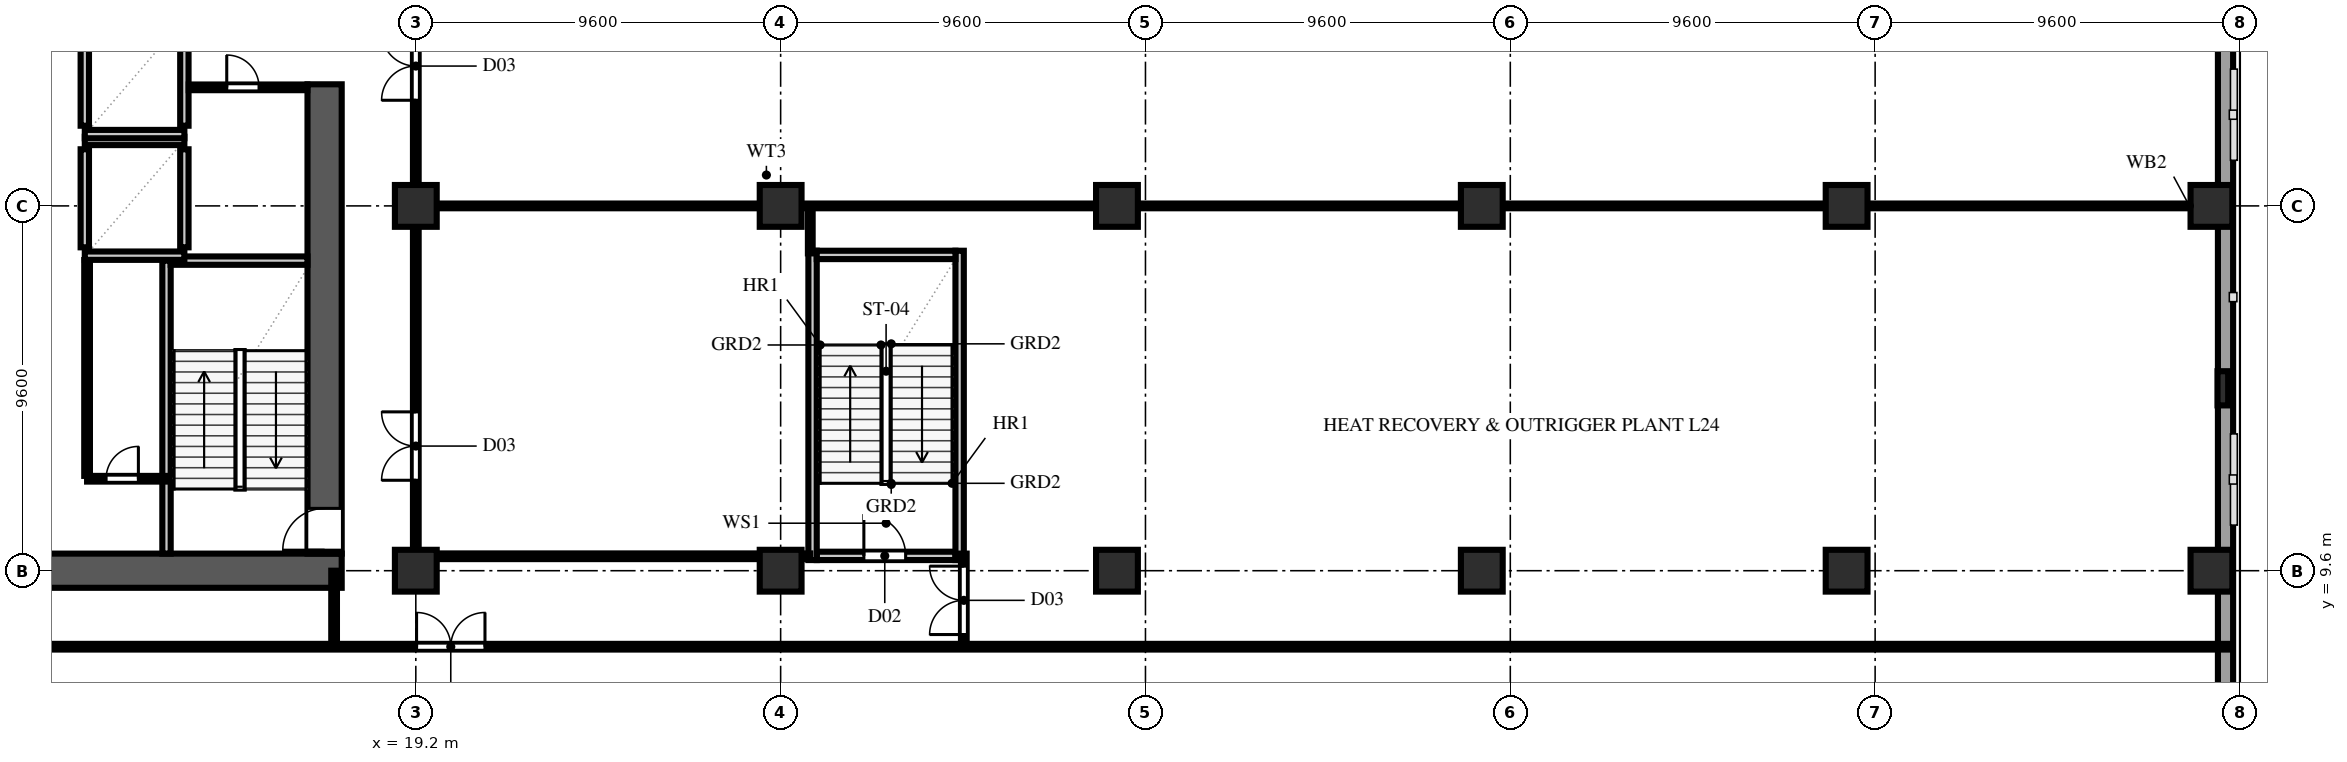
"""IFC4 building model, lengths in metres.
Left out: names, types, materials, properties, quantities, classifications, styles, units other than length and angle.
Written with IfcOpenShell. Run it as: python <this file> out.ifc"""

import sys

from ifc_helpers import new_model, si_unit, direction, frame, frame_2d, origin, origin_2d, place, context, subcontext, project, spatial, rectangle, extrude, element, fill, save


model = new_model("IFC4")
c1 = context("Model", 3, precision=1e-05, world=origin(), true_north=direction((0.0, 1.0)))
c2 = subcontext(c1, "Body", "Model", "MODEL_VIEW")
j1 = project(units=[si_unit("LENGTHUNIT", "METRE"), si_unit("PLANEANGLEUNIT", "RADIAN")], contexts=[c1])
p1 = place(None, origin())
s1 = spatial("IfcSite", under=j1, at=p1, CompositionType="ELEMENT")
p2 = place(p1, origin())
s2 = spatial("IfcBuilding", under=s1, at=p2, CompositionType="ELEMENT")
p3 = place(p2, frame((0.0, 0.0, 96.4)))
s3 = spatial("IfcBuildingStorey", under=s2, at=p3, CompositionType="ELEMENT", Elevation=96.4)
p4 = place(p3, frame((2.65, 9.6, 0.0), z_axis=(0.0, 0.0, 1.0), x_axis=(1.0, 0.0, 0.0)))
e1 = element("IfcWall", 1, at=p4, inside=s3, PredefinedType="SHEAR", context=c2, shape_type="SweptSolid", body=[
    extrude(rectangle(XDim=14.6, YDim=0.9, at=frame_2d((7.3, 0.0))), origin(), (0.0, 0.0, 1.0), 4.74),
])
p5 = place(p3, frame((16.8, 10.05, 0.0), z_axis=(0.0, 0.0, 1.0), x_axis=(0.0, 1.0, 0.0)))
e2 = element("IfcWall", 2, at=p5, inside=s3, PredefinedType="SHEAR", context=c2, shape_type="SweptSolid", body=[
    extrude(rectangle(XDim=12.35, YDim=0.9, at=frame_2d((6.175, 0.0))), origin(), (0.0, 0.0, 1.0), 4.74),
])
p6 = place(p5, frame((0.09, 0.0, 0.0)))
e3 = element("IfcOpeningElement", 3, at=p6, cuts=e2, PredefinedType="OPENING", context=c2, shape_type="SweptSolid", body=[
    extrude(rectangle(XDim=1.1, YDim=2.2, at=frame_2d((0.55, 1.1))), frame((0.0, 0.462, 0.0), z_axis=(0.0, -1.0, 0.0), x_axis=(1.0, 0.0, 0.0)), (0.0, 0.0, 1.0), 0.924),
])
for number, where, z_axis, x_axis in (
    (4, (19.2, 9.6, 0.0), (0.0, 0.0, 1.0), (1.0, 0.0, 0.0)),
    (5, (19.2, 19.2, 0.0), (0.0, 0.0, 1.0), (1.0, 0.0, 0.0)),
    (6, (28.8, 9.6, 0.0), (0.0, 0.0, 1.0), (1.0, 0.0, 0.0)),
    (7, (28.8, 19.2, 0.0), (0.0, 0.0, 1.0), (1.0, 0.0, 0.0)),
    (8, (37.65, 9.6, 0.0), (0.0, 0.0, 1.0), (1.0, 0.0, 0.0)),
    (9, (37.65, 19.2, 0.0), (0.0, 0.0, 1.0), (1.0, 0.0, 0.0)),
    (10, (47.25, 9.6, 0.0), (0.0, 0.0, 1.0), (1.0, 0.0, 0.0)),
    (11, (47.25, 19.2, 0.0), (0.0, 0.0, 1.0), (1.0, 0.0, 0.0)),
    (12, (56.85, 9.6, 0.0), (0.0, 0.0, 1.0), (1.0, 0.0, 0.0)),
    (13, (56.85, 19.2, 0.0), (0.0, 0.0, 1.0), (1.0, 0.0, 0.0)),
):
    element("IfcColumn", number, at=place(p3, frame(where, z_axis=z_axis, x_axis=x_axis)), inside=s3, PredefinedType="COLUMN", context=c2, shape_type="SweptSolid", body=[
        extrude(rectangle(XDim=1.1, YDim=1.1, at=origin_2d()), origin(), (0.0, 0.0, 1.0), 5.0),
    ])
for number, where, z_axis, x_axis in (
    (14, (66.45, 9.6, 0.0), (0.0, 0.0, 1.0), (1.0, 0.0, 0.0)),
    (15, (66.45, 19.2, 0.0), (0.0, 0.0, 1.0), (1.0, 0.0, 0.0)),
):
    element("IfcColumn", number, at=place(p3, frame(where, z_axis=z_axis, x_axis=x_axis)), inside=s3, PredefinedType="COLUMN", context=c2, shape_type="SweptSolid", body=[
        extrude(rectangle(XDim=1.1, YDim=1.1, at=origin_2d()), origin(), (0.0, 0.0, 1.0), 4.7),
    ])
p7 = place(p3, frame((66.75, 14.4, 0.0), z_axis=(0.0, 0.0, 1.0), x_axis=(0.0, 1.0, 0.0)))
e16 = element("IfcColumn", 16, at=p7, inside=s3, PredefinedType="PILASTER", context=c2, shape_type="SweptSolid", body=[
    extrude(rectangle(XDim=0.9, YDim=0.28, at=origin_2d()), origin(), (0.0, 0.0, 1.0), 4.7),
])
p8 = place(p3, frame((66.82, 1.84, 0.0), z_axis=(0.0, 0.0, 1.0), x_axis=(0.0, 1.0, 0.0)))
e17 = element("IfcWall", 17, at=p8, inside=s3, PredefinedType="SOLIDWALL", context=c2, shape_type="SweptSolid", body=[
    extrude(rectangle(XDim=34.72, YDim=0.4, at=frame_2d((17.36, 0.0))), origin(), (0.0, 0.0, 1.0), 4.7),
])
p9 = place(p3, frame((12.64, 10.05, 0.0), z_axis=(0.0, 0.0, 1.0), x_axis=(0.0, 1.0, 0.0)))
e18 = element("IfcWall", 18, at=p9, inside=s3, PredefinedType="SOLIDWALL", context=c2, shape_type="SweptSolid", body=[
    extrude(rectangle(XDim=7.71, YDim=0.22, at=frame_2d((3.855, 0.0))), origin(), (0.0, 0.0, 1.0), 4.74),
])
p10 = place(p3, frame((12.75, 17.76, 0.0), z_axis=(0.0, 0.0, 1.0), x_axis=(1.0, 0.0, 0.0)))
e19 = element("IfcWall", 19, at=p10, inside=s3, PredefinedType="SOLIDWALL", context=c2, shape_type="SweptSolid", body=[
    extrude(rectangle(XDim=3.6, YDim=0.22, at=frame_2d((1.8, 0.0))), origin(), (0.0, 0.0, 1.0), 4.74),
])
p11 = place(p3, frame((29.75, 9.99, 0.0), z_axis=(0.0, 0.0, 1.0), x_axis=(1.0, 0.0, 0.0)))
e20 = element("IfcWall", 20, at=p11, inside=s3, PredefinedType="SOLIDWALL", context=c2, shape_type="SweptSolid", body=[
    extrude(rectangle(XDim=3.65, YDim=0.22, at=frame_2d((1.825, 0.0))), origin(), (0.0, 0.0, 1.0), 4.74),
])
p12 = place(p11, frame((1.24, 0.0, 0.0)))
e21 = element("IfcOpeningElement", 21, at=p12, cuts=e20, PredefinedType="OPENING", context=c2, shape_type="SweptSolid", body=[
    extrude(rectangle(XDim=1.1, YDim=2.2, at=frame_2d((0.55, 1.1))), frame((0.0, 0.122, 0.0), z_axis=(0.0, -1.0, 0.0), x_axis=(1.0, 0.0, 0.0)), (0.0, 0.0, 1.0), 0.244),
])
for number, where, z_axis, x_axis in (
    (22, (29.64, 9.88, 0.0), (0.0, 0.0, 1.0), (0.0, 1.0, 0.0)),
    (23, (33.51, 9.88, 0.0), (0.0, 0.0, 1.0), (0.0, 1.0, 0.0)),
):
    element("IfcWall", number, at=place(p3, frame(where, z_axis=z_axis, x_axis=x_axis)), inside=s3, PredefinedType="SOLIDWALL", context=c2, shape_type="SweptSolid", body=[
        extrude(rectangle(XDim=8.14, YDim=0.22, at=frame_2d((4.07, 0.0))), origin(), (0.0, 0.0, 1.0), 4.74),
    ])
p13 = place(p3, frame((29.75, 17.91, 0.0), z_axis=(0.0, 0.0, 1.0), x_axis=(1.0, 0.0, 0.0)))
e24 = element("IfcWall", 24, at=p13, inside=s3, PredefinedType="SOLIDWALL", context=c2, shape_type="SweptSolid", body=[
    extrude(rectangle(XDim=3.65, YDim=0.22, at=frame_2d((1.825, 0.0))), origin(), (0.0, 0.0, 1.0), 4.74),
])
for number, where, z_axis, x_axis in (
    (25, (10.49, 18.11, 0.0), (0.0, 0.0, 1.0), (0.0, 1.0, 0.0)),
    (26, (13.11, 18.11, 0.0), (0.0, 0.0, 1.0), (0.0, 1.0, 0.0)),
):
    element("IfcWall", number, at=place(p3, frame(where, z_axis=z_axis, x_axis=x_axis)), inside=s3, PredefinedType="SOLIDWALL", context=c2, shape_type="SweptSolid", body=[
        extrude(rectangle(XDim=2.58, YDim=0.22, at=frame_2d((1.29, 0.0))), origin(), (0.0, 0.0, 1.0), 4.74),
    ])
for number, where, z_axis, x_axis in (
    (27, (10.49, 17.89, 0.0), (0.0, 0.0, 1.0), (1.0, 0.0, 0.0)),
    (28, (10.49, 20.91, 0.0), (0.0, 0.0, 1.0), (1.0, 0.0, 0.0)),
):
    element("IfcWall", number, at=place(p3, frame(where, z_axis=z_axis, x_axis=x_axis)), inside=s3, PredefinedType="SOLIDWALL", context=c2, shape_type="SweptSolid", body=[
        extrude(rectangle(XDim=2.62, YDim=0.22, at=frame_2d((1.31, 0.0))), origin(), (0.0, 0.0, 1.0), 4.74),
    ])
for number, where, z_axis, x_axis in (
    (29, (10.49, 21.31, 0.0), (0.0, 0.0, 1.0), (0.0, 1.0, 0.0)),
    (30, (13.11, 21.31, 0.0), (0.0, 0.0, 1.0), (0.0, 1.0, 0.0)),
):
    element("IfcWall", number, at=place(p3, frame(where, z_axis=z_axis, x_axis=x_axis)), inside=s3, PredefinedType="SOLIDWALL", context=c2, shape_type="SweptSolid", body=[
        extrude(rectangle(XDim=2.58, YDim=0.22, at=frame_2d((1.29, 0.0))), origin(), (0.0, 0.0, 1.0), 4.74),
    ])
p14 = place(p3, frame((10.49, 21.09, 0.0), z_axis=(0.0, 0.0, 1.0), x_axis=(1.0, 0.0, 0.0)))
e31 = element("IfcWall", 31, at=p14, inside=s3, PredefinedType="SOLIDWALL", context=c2, shape_type="SweptSolid", body=[
    extrude(rectangle(XDim=2.62, YDim=0.22, at=frame_2d((1.31, 0.0))), origin(), (0.0, 0.0, 1.0), 4.74),
])
p15 = place(p3, frame((10.55, 12.02, 0.0), z_axis=(0.0, 0.0, 1.0), x_axis=(1.0, 0.0, 0.0)))
e32 = element("IfcWall", 32, at=p15, inside=s3, PredefinedType="PARTITIONING", context=c2, shape_type="SweptSolid", body=[
    extrude(rectangle(XDim=2.08, YDim=0.15, at=frame_2d((1.04, 0.0))), origin(), (0.0, 0.0, 1.0), 4.74),
])
p16 = place(p15, frame((0.5, 0.0, 0.0)))
e33 = element("IfcOpeningElement", 33, at=p16, cuts=e32, PredefinedType="OPENING", context=c2, shape_type="SweptSolid", body=[
    extrude(rectangle(XDim=0.85, YDim=2.1, at=frame_2d((0.425, 1.05))), frame((0.0, 0.087, 0.0), z_axis=(0.0, -1.0, 0.0), x_axis=(1.0, 0.0, 0.0)), (0.0, 0.0, 1.0), 0.174),
])
p17 = place(p3, frame((10.55, 12.095, 0.0), z_axis=(0.0, 0.0, 1.0), x_axis=(0.0, 1.0, 0.0)))
e34 = element("IfcWall", 34, at=p17, inside=s3, PredefinedType="PARTITIONING", context=c2, shape_type="SweptSolid", body=[
    extrude(rectangle(XDim=5.68, YDim=0.15, at=frame_2d((2.84, 0.0))), origin(), (0.0, 0.0, 1.0), 4.74),
])
p18 = place(p3, frame((13.225, 22.32, 0.0), z_axis=(0.0, 0.0, 1.0), x_axis=(1.0, 0.0, 0.0)))
e35 = element("IfcWall", 35, at=p18, inside=s3, PredefinedType="PARTITIONING", context=c2, shape_type="SweptSolid", body=[
    extrude(rectangle(XDim=3.12, YDim=0.15, at=frame_2d((1.56, 0.0))), origin(), (0.0, 0.0, 1.0), 4.74),
])
p19 = place(p18, frame((1.0, 0.0, 0.0)))
e36 = element("IfcOpeningElement", 36, at=p19, cuts=e35, PredefinedType="OPENING", context=c2, shape_type="SweptSolid", body=[
    extrude(rectangle(XDim=0.85, YDim=2.1, at=frame_2d((0.425, 1.05))), frame((0.0, 0.087, 0.0), z_axis=(0.0, -1.0, 0.0), x_axis=(1.0, 0.0, 0.0)), (0.0, 0.0, 1.0), 0.174),
])
p20 = place(p3, frame((17.05, 7.6, 0.0), z_axis=(0.0, 0.0, 1.0), x_axis=(0.0, 1.0, 0.0)))
e37 = element("IfcWall", 37, at=p20, inside=s3, PredefinedType="PARTITIONING", context=c2, shape_type="SweptSolid", body=[
    extrude(rectangle(XDim=2.0, YDim=0.15, at=frame_2d((1.0, 0.0))), origin(), (0.0, 0.0, 1.0), 4.74),
])
p21 = place(p3, frame((0.22, 7.6, 0.0), z_axis=(0.0, 0.0, 1.0), x_axis=(1.0, 0.0, 0.0)))
e38 = element("IfcWall", 38, at=p21, inside=s3, PredefinedType="PARTITIONING", context=c2, shape_type="SweptSolid", body=[
    extrude(rectangle(XDim=66.76, YDim=0.15, at=frame_2d((33.38, 0.0))), origin(), (0.0, 0.0, 1.0), 4.74),
])
p22 = place(p21, frame((19.0, 0.0, 0.0)))
e39 = element("IfcOpeningElement", 39, at=p22, cuts=e38, PredefinedType="OPENING", context=c2, shape_type="SweptSolid", body=[
    extrude(rectangle(XDim=1.8, YDim=2.2, at=frame_2d((0.9, 1.1))), frame((0.0, 0.087, 0.0), z_axis=(0.0, -1.0, 0.0), x_axis=(1.0, 0.0, 0.0)), (0.0, 0.0, 1.0), 0.174),
])
p23 = place(p3, frame((33.62, 7.6, 0.0), z_axis=(0.0, 0.0, 1.0), x_axis=(0.0, 1.0, 0.0)))
e40 = element("IfcWall", 40, at=p23, inside=s3, PredefinedType="PARTITIONING", context=c2, shape_type="SweptSolid", body=[
    extrude(rectangle(XDim=2.45, YDim=0.15, at=frame_2d((1.225, 0.0))), origin(), (0.0, 0.0, 1.0), 4.74),
])
p24 = place(p23, frame((0.32, 0.0, 0.0)))
e41 = element("IfcOpeningElement", 41, at=p24, cuts=e40, PredefinedType="OPENING", context=c2, shape_type="SweptSolid", body=[
    extrude(rectangle(XDim=1.8, YDim=2.2, at=frame_2d((0.9, 1.1))), frame((0.0, 0.087, 0.0), z_axis=(0.0, -1.0, 0.0), x_axis=(1.0, 0.0, 0.0)), (0.0, 0.0, 1.0), 0.174),
])
p25 = place(p3, frame((19.2, 9.98, 0.0), z_axis=(0.0, 0.0, 1.0), x_axis=(1.0, 0.0, 0.0)))
e42 = element("IfcWall", 42, at=p25, inside=s3, PredefinedType="PARTITIONING", context=c2, shape_type="SweptSolid", body=[
    extrude(rectangle(XDim=10.38, YDim=0.15, at=frame_2d((5.19, 0.0))), origin(), (0.0, 0.0, 1.0), 4.74),
])
p26 = place(p3, frame((29.58, 17.95, 0.0), z_axis=(0.0, 0.0, 1.0), x_axis=(0.0, 1.0, 0.0)))
e43 = element("IfcWall", 43, at=p26, inside=s3, PredefinedType="PARTITIONING", context=c2, shape_type="SweptSolid", body=[
    extrude(rectangle(XDim=1.25, YDim=0.125, at=frame_2d((0.625, 0.0))), origin(), (0.0, 0.0, 1.0), 4.74),
])
p27 = place(p3, frame((19.2, 19.2, 0.0), z_axis=(0.0, 0.0, 1.0), x_axis=(1.0, 0.0, 0.0)))
e44 = element("IfcWall", 44, at=p27, inside=s3, PredefinedType="PARTITIONING", context=c2, shape_type="SweptSolid", body=[
    extrude(rectangle(XDim=18.45, YDim=0.125, at=frame_2d((9.225, 0.0))), origin(), (0.0, 0.0, 1.0), 2.323),
])
p28 = place(p3, frame((37.65, 19.2, 0.0), z_axis=(0.0, 0.0, 1.0), x_axis=(1.0, 0.0, 0.0)))
e45 = element("IfcWall", 45, at=p28, inside=s3, PredefinedType="PARTITIONING", context=c2, shape_type="SweptSolid", body=[
    extrude(rectangle(XDim=19.2, YDim=0.125, at=frame_2d((9.6, 0.0))), origin(), (0.0, 0.0, 1.0), 3.967),
])
p29 = place(p3, frame((56.85, 19.2, 0.0), z_axis=(0.0, 0.0, 1.0), x_axis=(1.0, 0.0, 0.0)))
e46 = element("IfcWall", 46, at=p29, inside=s3, PredefinedType="PARTITIONING", context=c2, shape_type="SweptSolid", body=[
    extrude(rectangle(XDim=9.6, YDim=0.125, at=frame_2d((4.8, 0.0))), origin(), (0.0, 0.0, 1.0), 3.927),
])
p30 = place(p3, frame((66.45, 19.2, 0.0), z_axis=(0.0, 0.0, 1.0), x_axis=(1.0, 0.0, 0.0)))
e47 = element("IfcWall", 47, at=p30, inside=s3, PredefinedType="PARTITIONING", context=c2, shape_type="SweptSolid", body=[
    extrude(rectangle(XDim=0.53, YDim=0.125, at=frame_2d((0.265, 0.0))), origin(), (0.0, 0.0, 1.0), 4.74),
])
p31 = place(p3, frame((19.2, 9.98, 0.0), z_axis=(0.0, 0.0, 1.0), x_axis=(0.0, 1.0, 0.0)))
e48 = element("IfcWall", 48, at=p31, inside=s3, PredefinedType="PARTITIONING", context=c2, shape_type="SweptSolid", body=[
    extrude(rectangle(XDim=56.47, YDim=0.15, at=frame_2d((28.235, 0.0))), origin(), (0.0, 0.0, 1.0), 3.967),
])
p32 = place(p31, frame((2.0, 0.0, 0.0)))
e49 = element("IfcOpeningElement", 49, at=p32, cuts=e48, PredefinedType="OPENING", context=c2, shape_type="SweptSolid", body=[
    extrude(rectangle(XDim=1.8, YDim=2.2, at=frame_2d((0.9, 1.1))), frame((0.0, 0.087, 0.0), z_axis=(0.0, -1.0, 0.0), x_axis=(1.0, 0.0, 0.0)), (0.0, 0.0, 1.0), 0.174),
])
p33 = place(p31, frame((12.0, 0.0, 0.0)))
e50 = element("IfcOpeningElement", 50, at=p33, cuts=e48, PredefinedType="OPENING", context=c2, shape_type="SweptSolid", body=[
    extrude(rectangle(XDim=1.8, YDim=2.2, at=frame_2d((0.9, 1.1))), frame((0.0, 0.087, 0.0), z_axis=(0.0, -1.0, 0.0), x_axis=(1.0, 0.0, 0.0)), (0.0, 0.0, 1.0), 0.174),
])
p34 = place(p31, frame((30.5, 0.0, 0.0)))
e51 = element("IfcOpeningElement", 51, at=p34, cuts=e48, PredefinedType="OPENING", context=c2, shape_type="SweptSolid", body=[
    extrude(rectangle(XDim=1.2, YDim=2.2, at=frame_2d((0.6, 1.1))), frame((0.0, 0.087, 0.0), z_axis=(0.0, -1.0, 0.0), x_axis=(1.0, 0.0, 0.0)), (0.0, 0.0, 1.0), 0.174),
])
p35 = place(p31, frame((40.5, 0.0, 0.0)))
e52 = element("IfcOpeningElement", 52, at=p35, cuts=e48, PredefinedType="OPENING", context=c2, shape_type="SweptSolid", body=[
    extrude(rectangle(XDim=1.8, YDim=2.2, at=frame_2d((0.9, 1.1))), frame((0.0, 0.087, 0.0), z_axis=(0.0, -1.0, 0.0), x_axis=(1.0, 0.0, 0.0)), (0.0, 0.0, 1.0), 0.174),
])
p36 = place(p6, origin())
e53 = element("IfcDoor", 53, at=p36, inside=s3, OperationType="SINGLE_SWING_LEFT", PredefinedType="DOOR", context=c2, shape_type="SweptSolid", body=[
    extrude(rectangle(XDim=1.1, YDim=2.2, at=frame_2d((0.55, 1.1))), frame((0.0, 0.025, 0.0), z_axis=(0.0, -1.0, 0.0), x_axis=(1.0, 0.0, 0.0)), (0.0, 0.0, 1.0), 0.05),
])
fill(e3, e53)
p37 = place(p12, origin())
e54 = element("IfcDoor", 54, at=p37, inside=s3, OperationType="SINGLE_SWING_LEFT", PredefinedType="DOOR", context=c2, shape_type="SweptSolid", body=[
    extrude(rectangle(XDim=1.1, YDim=2.2, at=frame_2d((0.55, 1.1))), frame((0.0, 0.025, 0.0), z_axis=(0.0, -1.0, 0.0), x_axis=(1.0, 0.0, 0.0)), (0.0, 0.0, 1.0), 0.05),
])
fill(e21, e54)
p38 = place(p16, origin())
e55 = element("IfcDoor", 55, at=p38, inside=s3, OperationType="SINGLE_SWING_RIGHT", PredefinedType="DOOR", context=c2, shape_type="SweptSolid", body=[
    extrude(rectangle(XDim=0.85, YDim=2.1, at=frame_2d((0.425, 1.05))), frame((0.0, 0.025, 0.0), z_axis=(0.0, -1.0, 0.0), x_axis=(1.0, 0.0, 0.0)), (0.0, 0.0, 1.0), 0.05),
])
fill(e33, e55)
p39 = place(p19, origin())
e56 = element("IfcDoor", 56, at=p39, inside=s3, OperationType="SINGLE_SWING_LEFT", PredefinedType="DOOR", context=c2, shape_type="SweptSolid", body=[
    extrude(rectangle(XDim=0.85, YDim=2.1, at=frame_2d((0.425, 1.05))), frame((0.0, 0.025, 0.0), z_axis=(0.0, -1.0, 0.0), x_axis=(1.0, 0.0, 0.0)), (0.0, 0.0, 1.0), 0.05),
])
fill(e36, e56)
p40 = place(p22, origin())
e57 = element("IfcDoor", 57, at=p40, inside=s3, OperationType="DOUBLE_DOOR_SINGLE_SWING", PredefinedType="DOOR", context=c2, shape_type="SweptSolid", body=[
    extrude(rectangle(XDim=1.8, YDim=2.2, at=frame_2d((0.9, 1.1))), frame((0.0, 0.025, 0.0), z_axis=(0.0, -1.0, 0.0), x_axis=(1.0, 0.0, 0.0)), (0.0, 0.0, 1.0), 0.05),
])
fill(e39, e57)
p41 = place(p24, origin())
e58 = element("IfcDoor", 58, at=p41, inside=s3, OperationType="DOUBLE_DOOR_SINGLE_SWING", PredefinedType="DOOR", context=c2, shape_type="SweptSolid", body=[
    extrude(rectangle(XDim=1.8, YDim=2.2, at=frame_2d((0.9, 1.1))), frame((0.0, 0.025, 0.0), z_axis=(0.0, -1.0, 0.0), x_axis=(1.0, 0.0, 0.0)), (0.0, 0.0, 1.0), 0.05),
])
fill(e41, e58)
p42 = place(p32, origin())
e59 = element("IfcDoor", 59, at=p42, inside=s3, OperationType="DOUBLE_DOOR_SINGLE_SWING", PredefinedType="DOOR", context=c2, shape_type="SweptSolid", body=[
    extrude(rectangle(XDim=1.8, YDim=2.2, at=frame_2d((0.9, 1.1))), frame((0.0, 0.025, 0.0), z_axis=(0.0, -1.0, 0.0), x_axis=(1.0, 0.0, 0.0)), (0.0, 0.0, 1.0), 0.05),
])
fill(e49, e59)
p43 = place(p33, origin())
e60 = element("IfcDoor", 60, at=p43, inside=s3, OperationType="DOUBLE_DOOR_SINGLE_SWING", PredefinedType="DOOR", context=c2, shape_type="SweptSolid", body=[
    extrude(rectangle(XDim=1.8, YDim=2.2, at=frame_2d((0.9, 1.1))), frame((0.0, 0.025, 0.0), z_axis=(0.0, -1.0, 0.0), x_axis=(1.0, 0.0, 0.0)), (0.0, 0.0, 1.0), 0.05),
])
fill(e50, e60)
save(model, sys.argv[1])
